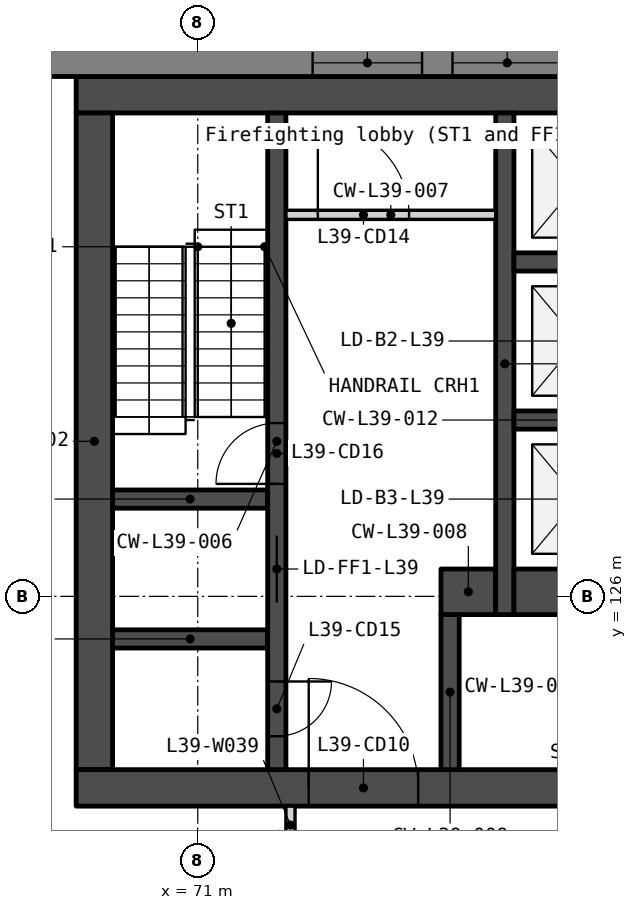
"""IFC4 building model, lengths in metres.
Left out: names, types, materials, properties, quantities, classifications, styles, units other than length and angle.
Written with IfcOpenShell. Run it as: python <this file> out.ifc"""

import sys

from ifc_helpers import new_model, si_unit, direction, frame, frame_2d, origin, place, context, subcontext, project, spatial, polyline, rectangle, outline, extrude, element, fill, save


model = new_model("IFC4")
c1 = context("Model", 3, precision=1e-05, world=origin(), true_north=direction((0.0, 1.0)))
c2 = subcontext(c1, "Body", "Model", "MODEL_VIEW")
j1 = project(units=[si_unit("LENGTHUNIT", "METRE"), si_unit("PLANEANGLEUNIT", "RADIAN")], contexts=[c1])
p1 = place(None, origin())
s1 = spatial("IfcSite", under=j1, at=p1, CompositionType="ELEMENT")
p2 = place(p1, origin())
s2 = spatial("IfcBuilding", under=s1, at=p2, CompositionType="ELEMENT")
p3 = place(p2, frame((0.0, 0.0, 155.9)))
s3 = spatial("IfcBuildingStorey", under=s2, at=p3, CompositionType="ELEMENT", Elevation=155.9)
p4 = place(p3, frame((69.0, 134.25, 0.0), z_axis=(0.0, 0.0, 1.0), x_axis=(1.0, 0.0, 0.0)))
e1 = element("IfcWall", 1, at=p4, inside=s3, PredefinedType="SOLIDWALL", context=c2, shape_type="SweptSolid", body=[
    extrude(rectangle(XDim=22.0, YDim=0.6, at=frame_2d((11.0, 0.0))), origin(), (0.0, 0.0, 1.0), 3.75),
])
p5 = place(p3, frame((69.3, 133.95, 0.0), z_axis=(0.0, 0.0, 1.0), x_axis=(0.0, -1.0, 0.0)))
e2 = element("IfcWall", 2, at=p5, inside=s3, PredefinedType="SOLIDWALL", context=c2, shape_type="SweptSolid", body=[
    extrude(rectangle(XDim=10.8, YDim=0.6, at=frame_2d((5.4, 0.0))), origin(), (0.0, 0.0, 1.0), 3.75),
])
p6 = place(p3, frame((69.0, 122.85, 0.0), z_axis=(0.0, 0.0, 1.0), x_axis=(1.0, 0.0, 0.0)))
e3 = element("IfcWall", 3, at=p6, inside=s3, PredefinedType="SOLIDWALL", context=c2, shape_type="SweptSolid", body=[
    extrude(rectangle(XDim=22.0, YDim=0.6, at=frame_2d((11.0, 0.0))), origin(), (0.0, 0.0, 1.0), 3.75),
])
p7 = place(p6, frame((16.375, 0.0, 0.0)))
e4 = element("IfcOpeningElement", 4, at=p7, cuts=e3, PredefinedType="OPENING", context=c2, shape_type="SweptSolid", body=[
    extrude(rectangle(XDim=1.8, YDim=2.1, at=frame_2d((0.9, 1.05))), frame((0.0, 0.31, 0.0), z_axis=(0.0, -1.0, 0.0), x_axis=(1.0, 0.0, 0.0)), (0.0, 0.0, 1.0), 0.62),
])
p8 = place(p6, frame((3.825, 0.0, 0.0)))
e5 = element("IfcOpeningElement", 5, at=p8, cuts=e3, PredefinedType="OPENING", context=c2, shape_type="SweptSolid", body=[
    extrude(rectangle(XDim=1.8, YDim=2.1, at=frame_2d((0.9, 1.05))), frame((0.0, 0.31, 0.0), z_axis=(0.0, -1.0, 0.0), x_axis=(1.0, 0.0, 0.0)), (0.0, 0.0, 1.0), 0.62),
])
p9 = place(p6, frame((12.85, 0.0, 0.0)))
e6 = element("IfcOpeningElement", 6, at=p9, cuts=e3, PredefinedType="OPENING", context=c2, shape_type="SweptSolid", body=[
    extrude(rectangle(XDim=1.5, YDim=2.1, at=frame_2d((0.75, 1.05))), frame((0.0, 0.31, 0.0), z_axis=(0.0, -1.0, 0.0), x_axis=(1.0, 0.0, 0.0)), (0.0, 0.0, 1.0), 0.62),
])
for number, where, z_axis, x_axis in (
    (7, (69.6, 127.6, 0.0), (0.0, 0.0, 1.0), (1.0, 0.0, 0.0)),
    (8, (69.6, 125.3, 0.0), (0.0, 0.0, 1.0), (1.0, 0.0, 0.0)),
):
    element("IfcWall", number, at=place(p3, frame(where, z_axis=z_axis, x_axis=x_axis)), inside=s3, PredefinedType="SOLIDWALL", context=c2, shape_type="SweptSolid", body=[
        extrude(rectangle(XDim=2.55, YDim=0.3, at=frame_2d((1.275, 0.0))), origin(), (0.0, 0.0, 1.0), 3.75),
    ])
p10 = place(p3, frame((72.3, 133.95, 0.0), z_axis=(0.0, 0.0, 1.0), x_axis=(0.0, -1.0, 0.0)))
e9 = element("IfcWall", 9, at=p10, inside=s3, PredefinedType="SOLIDWALL", context=c2, shape_type="SweptSolid", body=[
    extrude(rectangle(XDim=10.8, YDim=0.3, at=frame_2d((5.4, 0.0))), origin(), (0.0, 0.0, 1.0), 3.75),
])
p11 = place(p10, frame((6.95, 0.0, 0.0)))
e10 = element("IfcOpeningElement", 10, at=p11, cuts=e9, PredefinedType="OPENING", context=c2, shape_type="SweptSolid", body=[
    extrude(rectangle(XDim=1.1, YDim=2.1, at=frame_2d((0.55, 1.05))), frame((0.0, 0.16, 0.0), z_axis=(0.0, -1.0, 0.0), x_axis=(1.0, 0.0, 0.0)), (0.0, 0.0, 1.0), 0.32),
])
p12 = place(p10, frame((9.35, 0.0, 0.0)))
e11 = element("IfcOpeningElement", 11, at=p12, cuts=e9, PredefinedType="OPENING", context=c2, shape_type="SweptSolid", body=[
    extrude(rectangle(XDim=0.9, YDim=2.1, at=frame_2d((0.45, 1.05))), frame((0.0, 0.16, 0.0), z_axis=(0.0, -1.0, 0.0), x_axis=(1.0, 0.0, 0.0)), (0.0, 0.0, 1.0), 0.32),
])
p13 = place(p10, frame((5.1, 0.0, 0.0)))
e12 = element("IfcOpeningElement", 12, at=p13, cuts=e9, PredefinedType="OPENING", context=c2, shape_type="SweptSolid", body=[
    extrude(rectangle(XDim=1.0, YDim=2.1, at=frame_2d((0.5, 1.05))), frame((0.0, 0.16, 0.0), z_axis=(0.0, -1.0, 0.0), x_axis=(1.0, 0.0, 0.0)), (0.0, 0.0, 1.0), 0.32),
])
p14 = place(p3, frame((72.45, 132.275, 0.0), z_axis=(0.0, 0.0, 1.0), x_axis=(1.0, 0.0, 0.0)))
e13 = element("IfcWall", 13, at=p14, inside=s3, PredefinedType="PARTITIONING", context=c2, shape_type="SweptSolid", body=[
    extrude(rectangle(XDim=3.45, YDim=0.15, at=frame_2d((1.725, 0.0))), origin(), (0.0, 0.0, 1.0), 3.75),
])
p15 = place(p14, frame((0.525, 0.0, 0.0)))
e14 = element("IfcOpeningElement", 14, at=p15, cuts=e13, PredefinedType="OPENING", context=c2, shape_type="SweptSolid", body=[
    extrude(rectangle(XDim=1.5, YDim=2.1, at=frame_2d((0.75, 1.05))), frame((0.0, 0.085, 0.0), z_axis=(0.0, -1.0, 0.0), x_axis=(1.0, 0.0, 0.0)), (0.0, 0.0, 1.0), 0.17),
])
p16 = place(p3, frame((75.0, 126.075, 0.0), z_axis=(0.0, 0.0, 1.0), x_axis=(1.0, 0.0, 0.0)))
e15 = element("IfcWall", 15, at=p16, inside=s3, PredefinedType="SOLIDWALL", context=c2, shape_type="SweptSolid", body=[
    extrude(rectangle(XDim=0.9, YDim=0.75, at=frame_2d((0.45, 0.0))), origin(), (0.0, 0.0, 1.0), 3.75),
])
p17 = place(p3, frame((75.15, 125.7, 0.0), z_axis=(0.0, 0.0, 1.0), x_axis=(0.0, -1.0, 0.0)))
e16 = element("IfcWall", 16, at=p17, inside=s3, PredefinedType="SOLIDWALL", context=c2, shape_type="SweptSolid", body=[
    extrude(rectangle(XDim=2.55, YDim=0.3, at=frame_2d((1.275, 0.0))), origin(), (0.0, 0.0, 1.0), 3.75),
])
p18 = place(p3, frame((76.05, 133.95, 0.0), z_axis=(0.0, 0.0, 1.0), x_axis=(0.0, -1.0, 0.0)))
e17 = element("IfcWall", 17, at=p18, inside=s3, PredefinedType="SOLIDWALL", context=c2, shape_type="SweptSolid", body=[
    extrude(rectangle(XDim=8.25, YDim=0.3, at=frame_2d((4.125, 0.0))), origin(), (0.0, 0.0, 1.0), 3.75),
])
for number, where, z_axis, x_axis in (
    (18, (76.2, 131.5, 0.0), (0.0, 0.0, 1.0), (1.0, 0.0, 0.0)),
    (19, (76.2, 128.9, 0.0), (0.0, 0.0, 1.0), (1.0, 0.0, 0.0)),
):
    element("IfcWall", number, at=place(p3, frame(where, z_axis=z_axis, x_axis=x_axis)), inside=s3, PredefinedType="SOLIDWALL", context=c2, shape_type="SweptSolid", body=[
        extrude(rectangle(XDim=2.1, YDim=0.3, at=frame_2d((1.05, 0.0))), origin(), (0.0, 0.0, 1.0), 3.75),
    ])
p19 = place(p3, frame((76.2, 126.075, 0.0), z_axis=(0.0, 0.0, 1.0), x_axis=(1.0, 0.0, 0.0)))
e20 = element("IfcWall", 20, at=p19, inside=s3, PredefinedType="SOLIDWALL", context=c2, shape_type="SweptSolid", body=[
    extrude(rectangle(XDim=2.1, YDim=0.75, at=frame_2d((1.05, 0.0))), origin(), (0.0, 0.0, 1.0), 3.75),
])
p20 = place(p3, frame((100.243, 134.775, -0.15), z_axis=(0.0, 0.0, 1.0), x_axis=(-1.0, 0.0, 0.0)))
e21 = element("IfcWall", 21, at=p20, inside=s3, PredefinedType="SOLIDWALL", context=c2, shape_type="SweptSolid", body=[
    extrude(outline(polyline([(40.486, 0.0), (40.486, 3.9), (0.0, 3.9), (0.0, 0.0), (40.486, 0.0)])), frame((0.0, 0.225, 0.0), z_axis=(0.0, -1.0, 0.0), x_axis=(1.0, 0.0, 0.0)), (0.0, 0.0, 1.0), 0.45),
])
p21 = place(p20, frame((3.011, 0.0, 0.95)))
e22 = element("IfcOpeningElement", 22, at=p21, cuts=e21, PredefinedType="OPENING", context=c2, shape_type="SweptSolid", body=[
    extrude(rectangle(XDim=1.8, YDim=2.2, at=frame_2d((0.9, 1.1))), frame((0.0, 0.235, 0.0), z_axis=(0.0, -1.0, 0.0), x_axis=(1.0, 0.0, 0.0)), (0.0, 0.0, 1.0), 0.47),
])
p22 = place(p20, frame((5.311, 0.0, 0.95)))
e23 = element("IfcOpeningElement", 23, at=p22, cuts=e21, PredefinedType="OPENING", context=c2, shape_type="SweptSolid", body=[
    extrude(rectangle(XDim=1.8, YDim=2.2, at=frame_2d((0.9, 1.1))), frame((0.0, 0.235, 0.0), z_axis=(0.0, -1.0, 0.0), x_axis=(1.0, 0.0, 0.0)), (0.0, 0.0, 1.0), 0.47),
])
p23 = place(p20, frame((13.132, 0.0, 0.95)))
e24 = element("IfcOpeningElement", 24, at=p23, cuts=e21, PredefinedType="OPENING", context=c2, shape_type="SweptSolid", body=[
    extrude(rectangle(XDim=1.8, YDim=2.2, at=frame_2d((0.9, 1.1))), frame((0.0, 0.235, 0.0), z_axis=(0.0, -1.0, 0.0), x_axis=(1.0, 0.0, 0.0)), (0.0, 0.0, 1.0), 0.47),
])
p24 = place(p20, frame((15.432, 0.0, 0.95)))
e25 = element("IfcOpeningElement", 25, at=p24, cuts=e21, PredefinedType="OPENING", context=c2, shape_type="SweptSolid", body=[
    extrude(rectangle(XDim=1.8, YDim=2.2, at=frame_2d((0.9, 1.1))), frame((0.0, 0.235, 0.0), z_axis=(0.0, -1.0, 0.0), x_axis=(1.0, 0.0, 0.0)), (0.0, 0.0, 1.0), 0.47),
])
p25 = place(p20, frame((23.254, 0.0, 0.95)))
e26 = element("IfcOpeningElement", 26, at=p25, cuts=e21, PredefinedType="OPENING", context=c2, shape_type="SweptSolid", body=[
    extrude(rectangle(XDim=1.8, YDim=2.2, at=frame_2d((0.9, 1.1))), frame((0.0, 0.235, 0.0), z_axis=(0.0, -1.0, 0.0), x_axis=(1.0, 0.0, 0.0)), (0.0, 0.0, 1.0), 0.47),
])
p26 = place(p20, frame((25.554, 0.0, 0.95)))
e27 = element("IfcOpeningElement", 27, at=p26, cuts=e21, PredefinedType="OPENING", context=c2, shape_type="SweptSolid", body=[
    extrude(rectangle(XDim=1.8, YDim=2.2, at=frame_2d((0.9, 1.1))), frame((0.0, 0.235, 0.0), z_axis=(0.0, -1.0, 0.0), x_axis=(1.0, 0.0, 0.0)), (0.0, 0.0, 1.0), 0.47),
])
p27 = place(p20, frame((33.375, 0.0, 0.95)))
e28 = element("IfcOpeningElement", 28, at=p27, cuts=e21, PredefinedType="OPENING", context=c2, shape_type="SweptSolid", body=[
    extrude(rectangle(XDim=1.8, YDim=2.2, at=frame_2d((0.9, 1.1))), frame((0.0, 0.235, 0.0), z_axis=(0.0, -1.0, 0.0), x_axis=(1.0, 0.0, 0.0)), (0.0, 0.0, 1.0), 0.47),
])
p28 = place(p20, frame((35.675, 0.0, 0.95)))
e29 = element("IfcOpeningElement", 29, at=p28, cuts=e21, PredefinedType="OPENING", context=c2, shape_type="SweptSolid", body=[
    extrude(rectangle(XDim=1.8, YDim=2.2, at=frame_2d((0.9, 1.1))), frame((0.0, 0.235, 0.0), z_axis=(0.0, -1.0, 0.0), x_axis=(1.0, 0.0, 0.0)), (0.0, 0.0, 1.0), 0.47),
])
p29 = place(p3, frame((57.652, 131.129, -0.15), z_axis=(0.0, 0.0, 1.0), x_axis=(0.499997369791, -0.866026922331, 0.0)))
e30 = element("IfcWall", 30, at=p29, inside=s3, PredefinedType="SOLIDWALL", context=c2, shape_type="SweptSolid", body=[
    extrude(outline(polyline([(40.486, 0.0), (40.486, 3.9), (0.0, 3.9), (0.0, 0.0), (40.486, 0.0)])), frame((0.0, 0.225, 0.0), z_axis=(0.0, -1.0, 0.0), x_axis=(1.0, 0.0, 0.0)), (0.0, 0.0, 1.0), 0.45),
])
p30 = place(p29, frame((3.011, 0.0, 0.95)))
e31 = element("IfcOpeningElement", 31, at=p30, cuts=e30, PredefinedType="OPENING", context=c2, shape_type="SweptSolid", body=[
    extrude(rectangle(XDim=1.8, YDim=2.2, at=frame_2d((0.9, 1.1))), frame((0.0, 0.235, 0.0), z_axis=(0.0, -1.0, 0.0), x_axis=(1.0, 0.0, 0.0)), (0.0, 0.0, 1.0), 0.47),
])
p31 = place(p29, frame((5.311, 0.0, 0.95)))
e32 = element("IfcOpeningElement", 32, at=p31, cuts=e30, PredefinedType="OPENING", context=c2, shape_type="SweptSolid", body=[
    extrude(rectangle(XDim=1.8, YDim=2.2, at=frame_2d((0.9, 1.1))), frame((0.0, 0.235, 0.0), z_axis=(0.0, -1.0, 0.0), x_axis=(1.0, 0.0, 0.0)), (0.0, 0.0, 1.0), 0.47),
])
p32 = place(p29, frame((13.132, 0.0, 0.95)))
e33 = element("IfcOpeningElement", 33, at=p32, cuts=e30, PredefinedType="OPENING", context=c2, shape_type="SweptSolid", body=[
    extrude(rectangle(XDim=1.8, YDim=2.2, at=frame_2d((0.9, 1.1))), frame((0.0, 0.235, 0.0), z_axis=(0.0, -1.0, 0.0), x_axis=(1.0, 0.0, 0.0)), (0.0, 0.0, 1.0), 0.47),
])
p33 = place(p29, frame((15.432, 0.0, 0.95)))
e34 = element("IfcOpeningElement", 34, at=p33, cuts=e30, PredefinedType="OPENING", context=c2, shape_type="SweptSolid", body=[
    extrude(rectangle(XDim=1.8, YDim=2.2, at=frame_2d((0.9, 1.1))), frame((0.0, 0.235, 0.0), z_axis=(0.0, -1.0, 0.0), x_axis=(1.0, 0.0, 0.0)), (0.0, 0.0, 1.0), 0.47),
])
p34 = place(p29, frame((23.254, 0.0, 0.95)))
e35 = element("IfcOpeningElement", 35, at=p34, cuts=e30, PredefinedType="OPENING", context=c2, shape_type="SweptSolid", body=[
    extrude(rectangle(XDim=1.8, YDim=2.2, at=frame_2d((0.9, 1.1))), frame((0.0, 0.235, 0.0), z_axis=(0.0, -1.0, 0.0), x_axis=(1.0, 0.0, 0.0)), (0.0, 0.0, 1.0), 0.47),
])
p35 = place(p29, frame((25.554, 0.0, 0.95)))
e36 = element("IfcOpeningElement", 36, at=p35, cuts=e30, PredefinedType="OPENING", context=c2, shape_type="SweptSolid", body=[
    extrude(rectangle(XDim=1.8, YDim=2.2, at=frame_2d((0.9, 1.1))), frame((0.0, 0.235, 0.0), z_axis=(0.0, -1.0, 0.0), x_axis=(1.0, 0.0, 0.0)), (0.0, 0.0, 1.0), 0.47),
])
p36 = place(p29, frame((33.375, 0.0, 0.95)))
e37 = element("IfcOpeningElement", 37, at=p36, cuts=e30, PredefinedType="OPENING", context=c2, shape_type="SweptSolid", body=[
    extrude(rectangle(XDim=1.8, YDim=2.2, at=frame_2d((0.9, 1.1))), frame((0.0, 0.235, 0.0), z_axis=(0.0, -1.0, 0.0), x_axis=(1.0, 0.0, 0.0)), (0.0, 0.0, 1.0), 0.47),
])
p37 = place(p29, frame((35.675, 0.0, 0.95)))
e38 = element("IfcOpeningElement", 38, at=p37, cuts=e30, PredefinedType="OPENING", context=c2, shape_type="SweptSolid", body=[
    extrude(rectangle(XDim=1.8, YDim=2.2, at=frame_2d((0.9, 1.1))), frame((0.0, 0.235, 0.0), z_axis=(0.0, -1.0, 0.0), x_axis=(1.0, 0.0, 0.0)), (0.0, 0.0, 1.0), 0.47),
])
p38 = place(p3, frame((72.525, 121.927, 0.0), z_axis=(0.0, 0.0, 1.0), x_axis=(0.0, 1.0, 0.0)))
e39 = element("IfcWall", 39, at=p38, inside=s3, PredefinedType="PARTITIONING", context=c2, shape_type="SweptSolid", body=[
    extrude(rectangle(XDim=0.622, YDim=0.15, at=frame_2d((0.311, 0.0))), origin(), (0.0, 0.0, 1.0), 3.75),
])
p39 = place(p11, origin())
e40 = element("IfcDoor", 40, at=p39, inside=s3, OperationType="SLIDING_TO_LEFT", PredefinedType="DOOR", context=c2, shape_type="SweptSolid", body=[
    extrude(rectangle(XDim=1.1, YDim=2.1, at=frame_2d((0.55, 1.05))), frame((0.0, 0.025, 0.0), z_axis=(0.0, -1.0, 0.0), x_axis=(1.0, 0.0, 0.0)), (0.0, 0.0, 1.0), 0.05),
])
fill(e10, e40)
p40 = place(p8, origin())
e41 = element("IfcDoor", 41, at=p40, inside=s3, OperationType="DOUBLE_DOOR_DOUBLE_SWING", PredefinedType="DOOR", context=c2, shape_type="SweptSolid", body=[
    extrude(rectangle(XDim=1.8, YDim=2.1, at=frame_2d((0.9, 1.05))), frame((0.0, 0.025, 0.0), z_axis=(0.0, -1.0, 0.0), x_axis=(1.0, 0.0, 0.0)), (0.0, 0.0, 1.0), 0.05),
])
fill(e5, e41)
p41 = place(p15, origin())
e42 = element("IfcDoor", 42, at=p41, inside=s3, OperationType="DOUBLE_DOOR_DOUBLE_SWING", PredefinedType="DOOR", context=c2, shape_type="SweptSolid", body=[
    extrude(rectangle(XDim=1.5, YDim=2.1, at=frame_2d((0.75, 1.05))), frame((0.0, 0.025, 0.0), z_axis=(0.0, -1.0, 0.0), x_axis=(1.0, 0.0, 0.0)), (0.0, 0.0, 1.0), 0.05),
])
fill(e14, e42)
p42 = place(p12, origin())
e43 = element("IfcDoor", 43, at=p42, inside=s3, OperationType="SINGLE_SWING_LEFT", PredefinedType="DOOR", context=c2, shape_type="SweptSolid", body=[
    extrude(rectangle(XDim=0.9, YDim=2.1, at=frame_2d((0.45, 1.05))), frame((0.0, 0.025, 0.0), z_axis=(0.0, -1.0, 0.0), x_axis=(1.0, 0.0, 0.0)), (0.0, 0.0, 1.0), 0.05),
])
fill(e11, e43)
p43 = place(p13, origin())
e44 = element("IfcDoor", 44, at=p43, inside=s3, OperationType="SINGLE_SWING_RIGHT", PredefinedType="DOOR", context=c2, shape_type="SweptSolid", body=[
    extrude(rectangle(XDim=1.0, YDim=2.1, at=frame_2d((0.5, 1.05))), frame((0.0, 0.025, 0.0), z_axis=(0.0, -1.0, 0.0), x_axis=(1.0, 0.0, 0.0)), (0.0, 0.0, 1.0), 0.05),
])
fill(e12, e44)
p44 = place(p25, origin())
e45 = element("IfcWindow", 45, at=p44, inside=s3, PartitioningType="SINGLE_PANEL", PredefinedType="WINDOW", context=c2, shape_type="SweptSolid", body=[
    extrude(rectangle(XDim=1.8, YDim=2.2, at=frame_2d((0.9, 1.1))), frame((0.0, 0.03, 0.0), z_axis=(0.0, -1.0, 0.0), x_axis=(1.0, 0.0, 0.0)), (0.0, 0.0, 1.0), 0.06),
])
fill(e26, e45)
p45 = place(p26, origin())
e46 = element("IfcWindow", 46, at=p45, inside=s3, PartitioningType="SINGLE_PANEL", PredefinedType="WINDOW", context=c2, shape_type="SweptSolid", body=[
    extrude(rectangle(XDim=1.8, YDim=2.2, at=frame_2d((0.9, 1.1))), frame((0.0, 0.03, 0.0), z_axis=(0.0, -1.0, 0.0), x_axis=(1.0, 0.0, 0.0)), (0.0, 0.0, 1.0), 0.06),
])
fill(e27, e46)
save(model, sys.argv[1])
